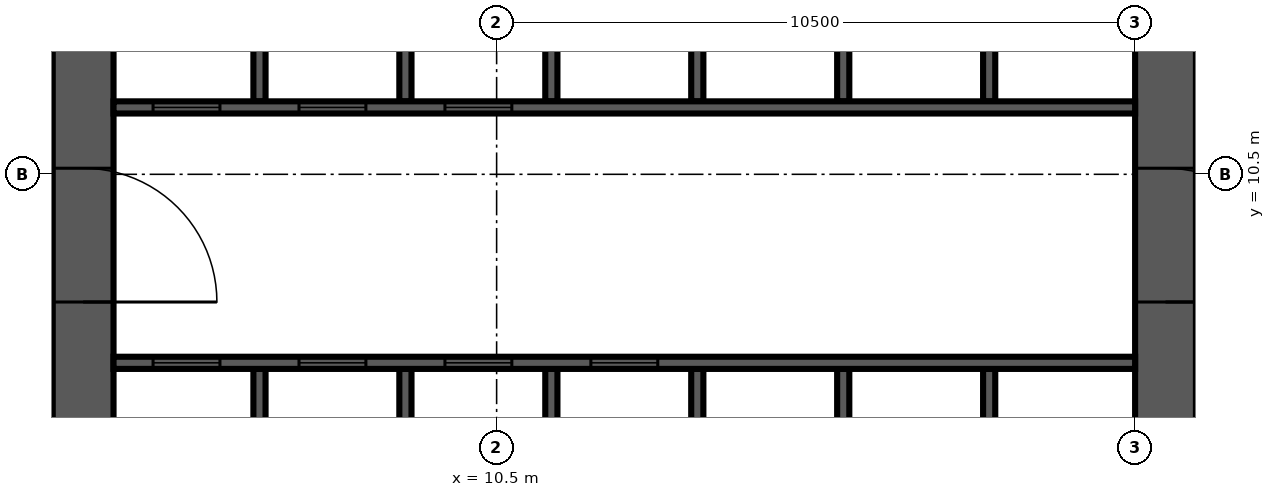
"""IFC4 building model, lengths in metres.
Left out: names, types, materials, properties, quantities, classifications, styles, units other than length and angle.
Written with IfcOpenShell. Run it as: python <this file> out.ifc"""

import sys

from ifc_helpers import new_model, si_unit, direction, frame, frame_2d, origin, place, context, subcontext, project, spatial, rectangle, extrude, source, transform, mapped, element, fill, save


model = new_model("IFC4")
c1 = context("Model", 3, precision=1e-05, world=origin(), true_north=direction((0.0, 1.0)))
c2 = subcontext(c1, "Body", "Model", "MODEL_VIEW")
j1 = project(units=[si_unit("LENGTHUNIT", "METRE"), si_unit("PLANEANGLEUNIT", "RADIAN")], contexts=[c1])
p1 = place(None, origin())
s1 = spatial("IfcSite", under=j1, at=p1, CompositionType="ELEMENT")
p2 = place(p1, origin())
s2 = spatial("IfcBuilding", under=s1, at=p2, CompositionType="ELEMENT")
p3 = place(p2, frame((0.0, 0.0, 111.9)))
s3 = spatial("IfcBuildingStorey", under=s2, at=p3, CompositionType="ELEMENT", Elevation=111.9)
m1 = source(origin(), c2, "Body", "SweptSolid", [
    extrude(rectangle(XDim=17.8, YDim=1.0, at=frame_2d((8.9, 0.0))), origin(), (0.0, 0.0, 1.0), 4.2),
])
p4 = place(p3, frame((3.7, 4.2, 0.0), z_axis=(0.0, 0.0, 1.0), x_axis=(0.0, 1.0, 0.0)))
e1 = element("IfcWall", 1, at=p4, inside=s3, PredefinedType="SHEAR", context=c2, shape_type="MappedRepresentation", body=[
    mapped(m1, transform((0.0, 0.0, 0.0), scale=1.0)),
])
m2 = source(origin(), c2, "Body", "SweptSolid", [
    extrude(rectangle(XDim=2.2, YDim=2.1, at=frame_2d((1.1, 1.05))), frame((0.0, 0.51, 0.0), z_axis=(0.0, -1.0, 0.0), x_axis=(1.0, 0.0, 0.0)), (0.0, 0.0, 1.0), 1.02),
])
p5 = place(p4, frame((4.2, 0.0, 0.0)))
e2 = element("IfcOpeningElement", 2, at=p5, cuts=e1, PredefinedType="OPENING", context=c2, shape_type="MappedRepresentation", body=[
    mapped(m2, transform((0.0, 0.0, 0.0), scale=1.0)),
])
m3 = source(origin(), c2, "Body", "SweptSolid", [
    extrude(rectangle(XDim=0.9, YDim=2.1, at=frame_2d((0.45, 1.05))), frame((0.0, 0.51, 0.0), z_axis=(0.0, -1.0, 0.0), x_axis=(1.0, 0.0, 0.0)), (0.0, 0.0, 1.0), 1.02),
])
p6 = place(p4, frame((10.95, 0.0, 0.0)))
e3 = element("IfcOpeningElement", 3, at=p6, cuts=e1, PredefinedType="OPENING", context=c2, shape_type="MappedRepresentation", body=[
    mapped(m3, transform((0.0, 0.0, 0.0), scale=1.0)),
])
m4 = source(origin(), c2, "Body", "SweptSolid", [
    extrude(rectangle(XDim=16.8, YDim=1.0, at=frame_2d((8.4, 0.0))), origin(), (0.0, 0.0, 1.0), 4.2),
])
p7 = place(p3, frame((21.5, 4.2, 0.0), z_axis=(0.0, 0.0, 1.0), x_axis=(0.0, 1.0, 0.0)))
e4 = element("IfcWall", 4, at=p7, inside=s3, PredefinedType="SHEAR", context=c2, shape_type="MappedRepresentation", body=[
    mapped(m4, transform((0.0, 0.0, 0.0), scale=1.0)),
])
p8 = place(p7, frame((4.2, 0.0, 0.0)))
e5 = element("IfcOpeningElement", 5, at=p8, cuts=e4, PredefinedType="OPENING", context=c2, shape_type="MappedRepresentation", body=[
    mapped(m2, transform((0.0, 0.0, 0.0), scale=1.0)),
])
m5 = source(origin(), c2, "Body", "SweptSolid", [
    extrude(rectangle(XDim=1.2, YDim=2.1, at=frame_2d((0.6, 1.05))), frame((0.0, 0.51, 0.0), z_axis=(0.0, -1.0, 0.0), x_axis=(1.0, 0.0, 0.0)), (0.0, 0.0, 1.0), 1.02),
])
p9 = place(p7, frame((14.7, 0.0, 0.0)))
e6 = element("IfcOpeningElement", 6, at=p9, cuts=e4, PredefinedType="OPENING", context=c2, shape_type="MappedRepresentation", body=[
    mapped(m5, transform((0.0, 0.0, 0.0), scale=1.0)),
])
m6 = source(origin(), c2, "Body", "SweptSolid", [
    extrude(rectangle(XDim=3.1, YDim=0.2, at=frame_2d((1.55, 0.0))), origin(), (0.0, 0.0, 1.0), 4.2),
])
for number, where, z_axis, x_axis in (
    (7, (6.6, 4.2, 0.0), (0.0, 0.0, 1.0), (0.0, 1.0, 0.0)),
    (8, (9.0, 4.2, 0.0), (0.0, 0.0, 1.0), (0.0, 1.0, 0.0)),
    (9, (11.4, 4.2, 0.0), (0.0, 0.0, 1.0), (0.0, 1.0, 0.0)),
    (10, (13.8, 4.2, 0.0), (0.0, 0.0, 1.0), (0.0, 1.0, 0.0)),
    (11, (16.2, 4.2, 0.0), (0.0, 0.0, 1.0), (0.0, 1.0, 0.0)),
    (12, (18.6, 4.2, 0.0), (0.0, 0.0, 1.0), (0.0, 1.0, 0.0)),
):
    element("IfcWall", number, at=place(p3, frame(where, z_axis=z_axis, x_axis=x_axis)), inside=s3, PredefinedType="SOLIDWALL", context=c2, shape_type="MappedRepresentation", body=[
        mapped(m6, transform((0.0, 0.0, 0.0), scale=1.0)),
    ])
m7 = source(origin(), c2, "Body", "SweptSolid", [
    extrude(rectangle(XDim=3.0, YDim=0.2, at=frame_2d((1.5, 0.0))), origin(), (0.0, 0.0, 1.0), 4.2),
])
for number, where, z_axis, x_axis in (
    (13, (6.6, 11.7, 0.0), (0.0, 0.0, 1.0), (0.0, 1.0, 0.0)),
    (14, (9.0, 11.7, 0.0), (0.0, 0.0, 1.0), (0.0, 1.0, 0.0)),
    (15, (11.4, 11.7, 0.0), (0.0, 0.0, 1.0), (0.0, 1.0, 0.0)),
    (16, (13.8, 11.7, 0.0), (0.0, 0.0, 1.0), (0.0, 1.0, 0.0)),
    (17, (16.2, 11.7, 0.0), (0.0, 0.0, 1.0), (0.0, 1.0, 0.0)),
    (18, (18.6, 11.7, 0.0), (0.0, 0.0, 1.0), (0.0, 1.0, 0.0)),
):
    element("IfcWall", number, at=place(p3, frame(where, z_axis=z_axis, x_axis=x_axis)), inside=s3, PredefinedType="SOLIDWALL", context=c2, shape_type="MappedRepresentation", body=[
        mapped(m7, transform((0.0, 0.0, 0.0), scale=1.0)),
    ])
m8 = source(origin(), c2, "Body", "SweptSolid", [
    extrude(rectangle(XDim=16.8, YDim=0.2, at=frame_2d((8.4, 0.0))), origin(), (0.0, 0.0, 1.0), 4.2),
])
p10 = place(p3, frame((4.2, 7.4, 0.0), z_axis=(0.0, 0.0, 1.0), x_axis=(1.0, 0.0, 0.0)))
e19 = element("IfcWall", 19, at=p10, inside=s3, PredefinedType="SOLIDWALL", context=c2, shape_type="MappedRepresentation", body=[
    mapped(m8, transform((0.0, 0.0, 0.0), scale=1.0)),
])
m9 = source(origin(), c2, "Body", "SweptSolid", [
    extrude(rectangle(XDim=1.1, YDim=2.1, at=frame_2d((0.55, 1.05))), frame((0.0, 0.11, 0.0), z_axis=(0.0, -1.0, 0.0), x_axis=(1.0, 0.0, 0.0)), (0.0, 0.0, 1.0), 0.22),
])
p11 = place(p10, frame((0.65, 0.0, 0.0)))
e20 = element("IfcOpeningElement", 20, at=p11, cuts=e19, PredefinedType="OPENING", context=c2, shape_type="MappedRepresentation", body=[
    mapped(m9, transform((0.0, 0.0, 0.0), scale=1.0)),
])
p12 = place(p10, frame((3.05, 0.0, 0.0)))
e21 = element("IfcOpeningElement", 21, at=p12, cuts=e19, PredefinedType="OPENING", context=c2, shape_type="MappedRepresentation", body=[
    mapped(m9, transform((0.0, 0.0, 0.0), scale=1.0)),
])
p13 = place(p10, frame((5.45, 0.0, 0.0)))
e22 = element("IfcOpeningElement", 22, at=p13, cuts=e19, PredefinedType="OPENING", context=c2, shape_type="MappedRepresentation", body=[
    mapped(m9, transform((0.0, 0.0, 0.0), scale=1.0)),
])
p14 = place(p10, frame((7.85, 0.0, 0.0)))
e23 = element("IfcOpeningElement", 23, at=p14, cuts=e19, PredefinedType="OPENING", context=c2, shape_type="MappedRepresentation", body=[
    mapped(m9, transform((0.0, 0.0, 0.0), scale=1.0)),
])
p15 = place(p3, frame((4.2, 11.6, 0.0), z_axis=(0.0, 0.0, 1.0), x_axis=(1.0, 0.0, 0.0)))
e24 = element("IfcWall", 24, at=p15, inside=s3, PredefinedType="SOLIDWALL", context=c2, shape_type="MappedRepresentation", body=[
    mapped(m8, transform((0.0, 0.0, 0.0), scale=1.0)),
])
p16 = place(p15, frame((0.65, 0.0, 0.0)))
e25 = element("IfcOpeningElement", 25, at=p16, cuts=e24, PredefinedType="OPENING", context=c2, shape_type="MappedRepresentation", body=[
    mapped(m9, transform((0.0, 0.0, 0.0), scale=1.0)),
])
p17 = place(p15, frame((3.05, 0.0, 0.0)))
e26 = element("IfcOpeningElement", 26, at=p17, cuts=e24, PredefinedType="OPENING", context=c2, shape_type="MappedRepresentation", body=[
    mapped(m9, transform((0.0, 0.0, 0.0), scale=1.0)),
])
p18 = place(p15, frame((5.45, 0.0, 0.0)))
e27 = element("IfcOpeningElement", 27, at=p18, cuts=e24, PredefinedType="OPENING", context=c2, shape_type="MappedRepresentation", body=[
    mapped(m9, transform((0.0, 0.0, 0.0), scale=1.0)),
])
m10 = source(origin(), c2, "Body", "SweptSolid", [
    extrude(rectangle(XDim=1.1, YDim=2.1, at=frame_2d((0.55, 1.05))), frame((0.0, 0.025, 0.0), z_axis=(0.0, -1.0, 0.0), x_axis=(1.0, 0.0, 0.0)), (0.0, 0.0, 1.0), 0.05),
])
p19 = place(p11, origin())
e28 = element("IfcDoor", 28, at=p19, inside=s3, OperationType="SLIDING_TO_LEFT", PredefinedType="DOOR", context=c2, shape_type="MappedRepresentation", body=[
    mapped(m10, transform((0.0, 0.0, 0.0), scale=1.0)),
])
fill(e20, e28)
p20 = place(p12, origin())
e29 = element("IfcDoor", 29, at=p20, inside=s3, OperationType="SLIDING_TO_LEFT", PredefinedType="DOOR", context=c2, shape_type="MappedRepresentation", body=[
    mapped(m10, transform((0.0, 0.0, 0.0), scale=1.0)),
])
fill(e21, e29)
p21 = place(p13, origin())
e30 = element("IfcDoor", 30, at=p21, inside=s3, OperationType="SLIDING_TO_LEFT", PredefinedType="DOOR", context=c2, shape_type="MappedRepresentation", body=[
    mapped(m10, transform((0.0, 0.0, 0.0), scale=1.0)),
])
fill(e22, e30)
p22 = place(p14, origin())
e31 = element("IfcDoor", 31, at=p22, inside=s3, OperationType="SLIDING_TO_LEFT", PredefinedType="DOOR", context=c2, shape_type="MappedRepresentation", body=[
    mapped(m10, transform((0.0, 0.0, 0.0), scale=1.0)),
])
fill(e23, e31)
p23 = place(p16, origin())
e32 = element("IfcDoor", 32, at=p23, inside=s3, OperationType="SLIDING_TO_LEFT", PredefinedType="DOOR", context=c2, shape_type="MappedRepresentation", body=[
    mapped(m10, transform((0.0, 0.0, 0.0), scale=1.0)),
])
fill(e25, e32)
p24 = place(p17, origin())
e33 = element("IfcDoor", 33, at=p24, inside=s3, OperationType="SLIDING_TO_LEFT", PredefinedType="DOOR", context=c2, shape_type="MappedRepresentation", body=[
    mapped(m10, transform((0.0, 0.0, 0.0), scale=1.0)),
])
fill(e26, e33)
p25 = place(p18, origin())
e34 = element("IfcDoor", 34, at=p25, inside=s3, OperationType="SLIDING_TO_LEFT", PredefinedType="DOOR", context=c2, shape_type="MappedRepresentation", body=[
    mapped(m10, transform((0.0, 0.0, 0.0), scale=1.0)),
])
fill(e27, e34)
m11 = source(origin(), c2, "Body", "SweptSolid", [
    extrude(rectangle(XDim=2.2, YDim=2.1, at=frame_2d((1.1, 1.05))), frame((0.0, 0.025, 0.0), z_axis=(0.0, -1.0, 0.0), x_axis=(1.0, 0.0, 0.0)), (0.0, 0.0, 1.0), 0.05),
])
p26 = place(p8, origin())
e35 = element("IfcDoor", 35, at=p26, inside=s3, OperationType="DOUBLE_DOOR_SINGLE_SWING", PredefinedType="DOOR", context=c2, shape_type="MappedRepresentation", body=[
    mapped(m11, transform((0.0, 0.0, 0.0), scale=1.0)),
])
fill(e5, e35)
p27 = place(p5, origin())
e36 = element("IfcDoor", 36, at=p27, inside=s3, OperationType="DOUBLE_DOOR_SINGLE_SWING", PredefinedType="DOOR", context=c2, shape_type="MappedRepresentation", body=[
    mapped(m11, transform((0.0, 0.0, 0.0), scale=1.0)),
])
fill(e2, e36)
save(model, sys.argv[1])
